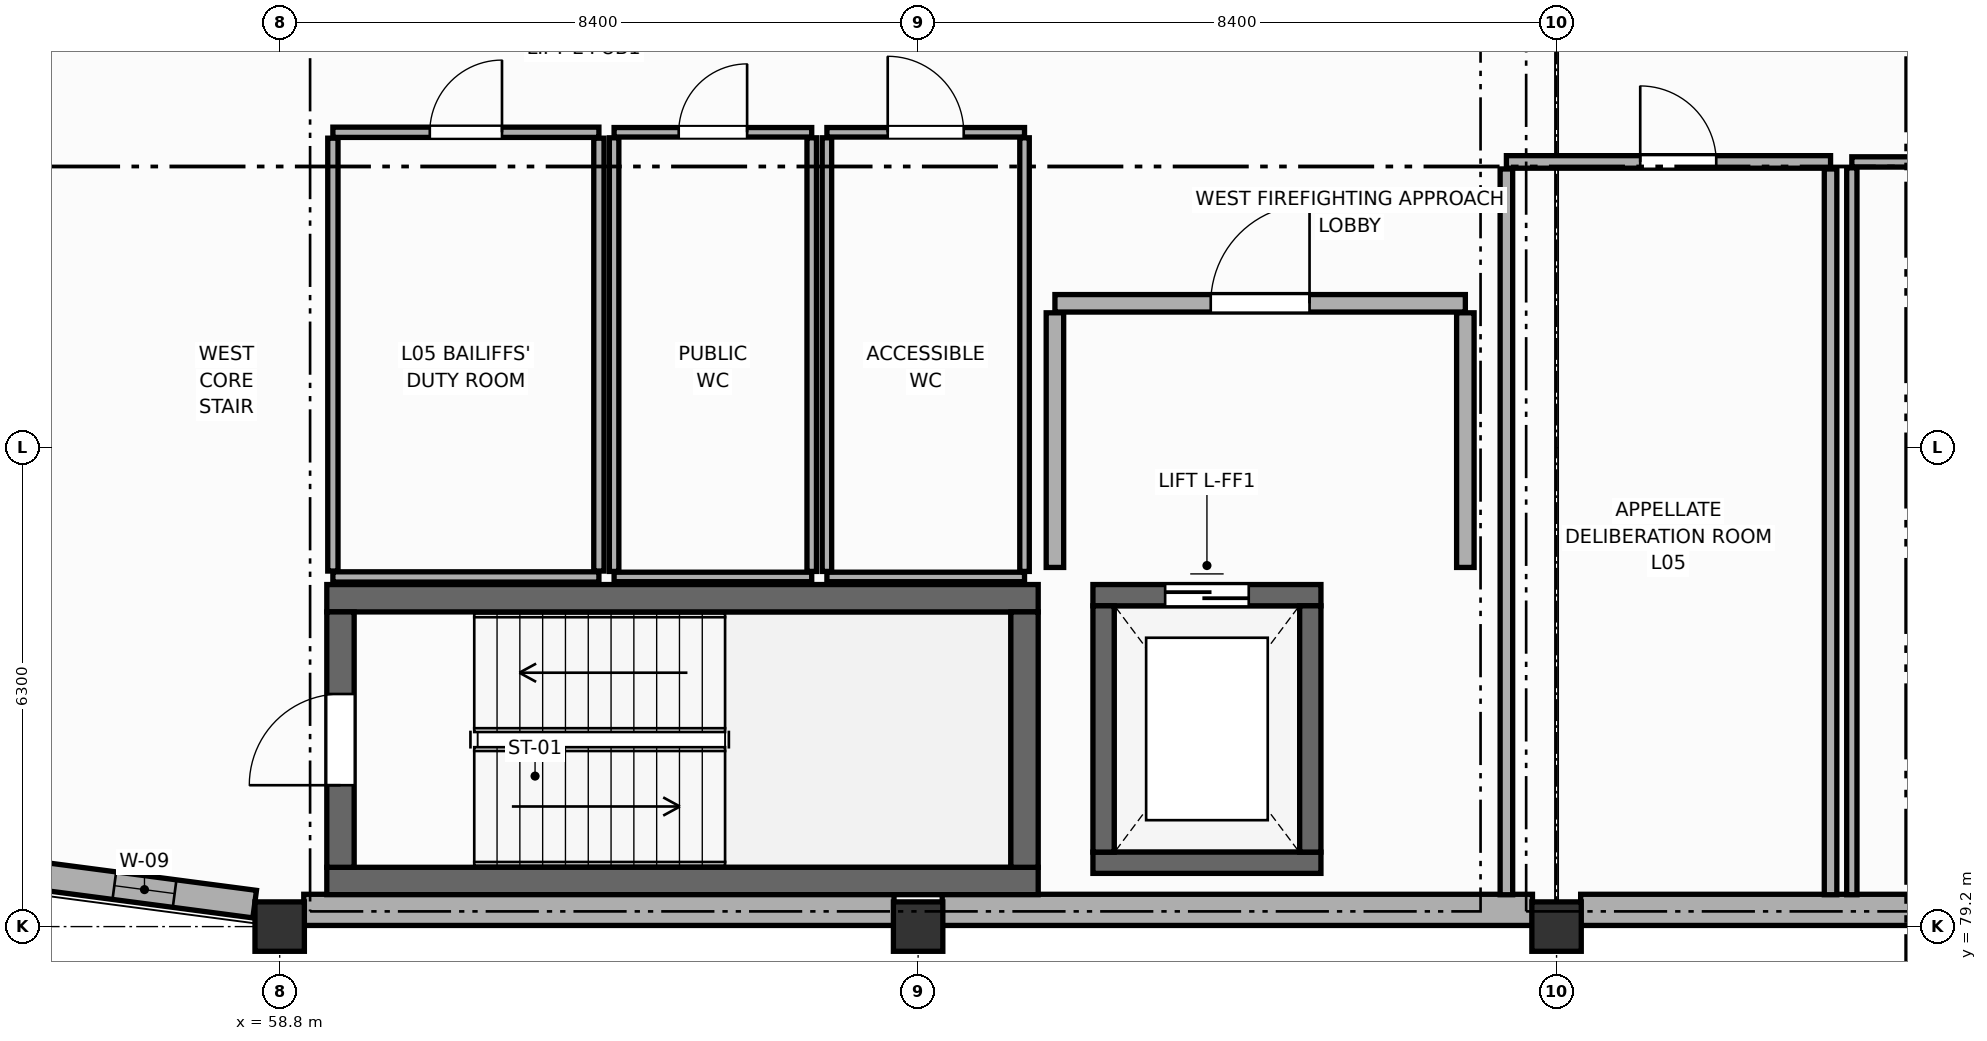
"""IFC4 building model, lengths in metres.
Left out: names, types, materials, properties, quantities, classifications, styles, units other than length and angle.
Written with IfcOpenShell. Run it as: python <this file> out.ifc"""

import sys

from ifc_helpers import new_model, si_unit, direction, frame, frame_2d, origin, origin_2d, place, context, subcontext, project, spatial, rectangle, extrude, element, fill, save


model = new_model("IFC4")
c1 = context("Model", 3, precision=1e-05, world=origin(), true_north=direction((0.0, 1.0)))
c2 = subcontext(c1, "Body", "Model", "MODEL_VIEW")
j1 = project(units=[si_unit("LENGTHUNIT", "METRE"), si_unit("PLANEANGLEUNIT", "RADIAN")], contexts=[c1])
p1 = place(None, origin())
s1 = spatial("IfcSite", under=j1, at=p1, CompositionType="ELEMENT")
p2 = place(p1, origin())
s2 = spatial("IfcBuilding", under=s1, at=p2, CompositionType="ELEMENT")
p3 = place(p2, frame((0.0, 0.0, 18.6)))
s3 = spatial("IfcBuildingStorey", under=s2, at=p3, CompositionType="ELEMENT", Elevation=18.6)
for number, where, z_axis, x_axis in (
    (1, (58.8, 79.2, 0.0), (0.0, 0.0, 1.0), (1.0, 0.0, 0.0)),
    (2, (67.2, 79.2, 0.0), (0.0, 0.0, 1.0), (1.0, 0.0, 0.0)),
    (3, (75.6, 79.2, 0.0), (0.0, 0.0, 1.0), (1.0, 0.0, 0.0)),
):
    element("IfcColumn", number, at=place(p3, frame(where, z_axis=z_axis, x_axis=x_axis)), inside=s3, PredefinedType="COLUMN", context=c2, shape_type="SweptSolid", body=[
        extrude(rectangle(XDim=0.65, YDim=0.65, at=origin_2d()), origin(), (0.0, 0.0, 1.0), 4.2),
    ])
p4 = place(p3, frame((66.883, 79.42, 0.0), z_axis=(0.0, 0.0, 1.0), x_axis=(-1.0, 0.0, 0.0)))
e4 = element("IfcWall", 4, at=p4, inside=s3, PredefinedType="STANDARD", context=c2, shape_type="SweptSolid", body=[
    extrude(rectangle(XDim=7.766, YDim=0.41, at=frame_2d((3.883, 0.0))), origin(), (0.0, 0.0, 1.0), 3.09),
])
p5 = place(p3, frame((75.283, 79.42, 0.0), z_axis=(0.0, 0.0, 1.0), x_axis=(-1.0, 0.0, 0.0)))
e5 = element("IfcWall", 5, at=p5, inside=s3, PredefinedType="STANDARD", context=c2, shape_type="SweptSolid", body=[
    extrude(rectangle(XDim=7.766, YDim=0.41, at=frame_2d((3.883, 0.0))), origin(), (0.0, 0.0, 1.0), 2.44),
])
p6 = place(p3, frame((83.683, 79.42, 0.0), z_axis=(0.0, 0.0, 1.0), x_axis=(-1.0, 0.0, 0.0)))
e6 = element("IfcWall", 6, at=p6, inside=s3, PredefinedType="STANDARD", context=c2, shape_type="SweptSolid", body=[
    extrude(rectangle(XDim=7.766, YDim=0.41, at=frame_2d((3.883, 0.0))), origin(), (0.0, 0.0, 1.0), 2.44),
])
p7 = place(p3, frame((55.572, 79.877, 0.0), z_axis=(0.0, 0.0, 1.0), x_axis=(0.99144889538, -0.13049554724, 0.0)))
e7 = element("IfcWall", 7, at=p7, inside=s3, PredefinedType="ELEMENTEDWALL", context=c2, shape_type="SweptSolid", body=[
    extrude(rectangle(XDim=2.924, YDim=0.365, at=frame_2d((1.462, 0.0))), origin(), (0.0, 0.0, 1.0), 3.09),
])
p8 = place(p7, frame((1.062, 0.0, 0.85)))
e8 = element("IfcOpeningElement", 8, at=p8, cuts=e7, PredefinedType="OPENING", context=c2, shape_type="SweptSolid", body=[
    extrude(rectangle(XDim=0.8, YDim=1.7, at=frame_2d((0.4, 0.85))), frame((0.0, 0.192, 0.0), z_axis=(0.0, -1.0, 0.0), x_axis=(1.0, 0.0, 0.0)), (0.0, 0.0, 1.0), 0.385),
])
for number, where, z_axis, x_axis in (
    (9, (59.42, 83.52, 0.0), (0.0, 0.0, 1.0), (1.0, 0.0, 0.0)),
    (10, (68.78, 79.8, 0.0), (0.0, 0.0, 1.0), (-1.0, 0.0, 0.0)),
):
    element("IfcWall", number, at=place(p3, frame(where, z_axis=z_axis, x_axis=x_axis)), inside=s3, PredefinedType="SHEAR", context=c2, shape_type="SweptSolid", body=[
        extrude(rectangle(XDim=9.36, YDim=0.36, at=frame_2d((4.68, 0.0))), origin(), (0.0, 0.0, 1.0), 3.96),
    ])
p9 = place(p3, frame((59.6, 79.98, 0.0), z_axis=(0.0, 0.0, 1.0), x_axis=(0.0, 1.0, 0.0)))
e11 = element("IfcWall", 11, at=p9, inside=s3, PredefinedType="SHEAR", context=c2, shape_type="SweptSolid", body=[
    extrude(rectangle(XDim=3.36, YDim=0.36, at=frame_2d((1.68, 0.0))), origin(), (0.0, 0.0, 1.0), 3.96),
])
p10 = place(p9, frame((1.08, 0.0, 0.0)))
e12 = element("IfcOpeningElement", 12, at=p10, cuts=e11, PredefinedType="OPENING", context=c2, shape_type="SweptSolid", body=[
    extrude(rectangle(XDim=1.2, YDim=2.2, at=frame_2d((0.6, 1.1))), frame((0.0, 0.19, 0.0), z_axis=(0.0, -1.0, 0.0), x_axis=(1.0, 0.0, 0.0)), (0.0, 0.0, 1.0), 0.38),
])
p11 = place(p3, frame((68.6, 83.34, 0.0), z_axis=(0.0, 0.0, 1.0), x_axis=(0.0, -1.0, 0.0)))
e13 = element("IfcWall", 13, at=p11, inside=s3, PredefinedType="SHEAR", context=c2, shape_type="SweptSolid", body=[
    extrude(rectangle(XDim=3.36, YDim=0.36, at=frame_2d((1.68, 0.0))), origin(), (0.0, 0.0, 1.0), 3.96),
])
p12 = place(p3, frame((69.5, 83.56, 0.0), z_axis=(0.0, 0.0, 1.0), x_axis=(1.0, 0.0, 0.0)))
e14 = element("IfcWall", 14, at=p12, inside=s3, PredefinedType="SHEAR", context=c2, shape_type="SweptSolid", body=[
    extrude(rectangle(XDim=3.0, YDim=0.28, at=frame_2d((1.5, 0.0))), origin(), (0.0, 0.0, 1.0), 3.96),
])
p13 = place(p12, frame((0.95, 0.0, 0.0)))
e15 = element("IfcOpeningElement", 15, at=p13, cuts=e14, PredefinedType="OPENING", context=c2, shape_type="SweptSolid", body=[
    extrude(rectangle(XDim=1.1, YDim=2.2, at=frame_2d((0.55, 1.1))), frame((0.0, 0.15, 0.0), z_axis=(0.0, -1.0, 0.0), x_axis=(1.0, 0.0, 0.0)), (0.0, 0.0, 1.0), 0.3),
])
p14 = place(p3, frame((72.5, 80.04, 0.0), z_axis=(0.0, 0.0, 1.0), x_axis=(-1.0, 0.0, 0.0)))
e16 = element("IfcWall", 16, at=p14, inside=s3, PredefinedType="SHEAR", context=c2, shape_type="SweptSolid", body=[
    extrude(rectangle(XDim=3.0, YDim=0.28, at=frame_2d((1.5, 0.0))), origin(), (0.0, 0.0, 1.0), 3.96),
])
for number, where, z_axis, x_axis in (
    (17, (69.64, 80.18, 0.0), (0.0, 0.0, 1.0), (0.0, 1.0, 0.0)),
    (18, (72.36, 83.42, 0.0), (0.0, 0.0, 1.0), (0.0, -1.0, 0.0)),
):
    element("IfcWall", number, at=place(p3, frame(where, z_axis=z_axis, x_axis=x_axis)), inside=s3, PredefinedType="SHEAR", context=c2, shape_type="SweptSolid", body=[
        extrude(rectangle(XDim=3.24, YDim=0.28, at=frame_2d((1.62, 0.0))), origin(), (0.0, 0.0, 1.0), 3.96),
    ])
p15 = place(p3, frame((69.0, 87.4, 0.0), z_axis=(0.0, 0.0, 1.0), x_axis=(1.0, 0.0, 0.0)))
e19 = element("IfcWall", 19, at=p15, inside=s3, PredefinedType="STANDARD", context=c2, shape_type="SweptSolid", body=[
    extrude(rectangle(XDim=5.4, YDim=0.23, at=frame_2d((2.7, 0.0))), origin(), (0.0, 0.0, 1.0), 3.34),
])
p16 = place(p15, frame((2.05, 0.0, 0.0)))
e20 = element("IfcOpeningElement", 20, at=p16, cuts=e19, PredefinedType="OPENING", context=c2, shape_type="SweptSolid", body=[
    extrude(rectangle(XDim=1.3, YDim=2.2, at=frame_2d((0.65, 1.1))), frame((0.0, 0.125, 0.0), z_axis=(0.0, -1.0, 0.0), x_axis=(1.0, 0.0, 0.0)), (0.0, 0.0, 1.0), 0.25),
])
for number, where, z_axis, x_axis in (
    (21, (69.0, 83.925, 0.0), (0.0, 0.0, 1.0), (0.0, 1.0, 0.0)),
    (22, (74.4, 87.275, 0.0), (0.0, 0.0, 1.0), (0.0, -1.0, 0.0)),
):
    element("IfcWall", number, at=place(p3, frame(where, z_axis=z_axis, x_axis=x_axis)), inside=s3, PredefinedType="STANDARD", context=c2, shape_type="SweptSolid", body=[
        extrude(rectangle(XDim=3.35, YDim=0.23, at=frame_2d((1.675, 0.0))), origin(), (0.0, 0.0, 1.0), 3.34),
    ])
p17 = place(p3, frame((63.2, 89.65, 0.0), z_axis=(0.0, 0.0, 1.0), x_axis=(1.0, 0.0, 0.0)))
e23 = element("IfcWall", 23, at=p17, inside=s3, PredefinedType="PARTITIONING", context=c2, shape_type="SweptSolid", body=[
    extrude(rectangle(XDim=2.6, YDim=0.125, at=frame_2d((1.3, 0.0))), origin(), (0.0, 0.0, 1.0), 3.945),
])
p18 = place(p17, frame((0.85, 0.0, 0.0)))
e24 = element("IfcOpeningElement", 24, at=p18, cuts=e23, PredefinedType="OPENING", context=c2, shape_type="SweptSolid", body=[
    extrude(rectangle(XDim=0.9, YDim=2.1, at=frame_2d((0.45, 1.05))), frame((0.0, 0.073, 0.0), z_axis=(0.0, -1.0, 0.0), x_axis=(1.0, 0.0, 0.0)), (0.0, 0.0, 1.0), 0.145),
])
p19 = place(p3, frame((65.8, 83.8, 0.0), z_axis=(0.0, 0.0, 1.0), x_axis=(-1.0, 0.0, 0.0)))
e25 = element("IfcWall", 25, at=p19, inside=s3, PredefinedType="PARTITIONING", context=c2, shape_type="SweptSolid", body=[
    extrude(rectangle(XDim=2.6, YDim=0.125, at=frame_2d((1.3, 0.0))), origin(), (0.0, 0.0, 1.0), 3.945),
])
for number, where, z_axis, x_axis in (
    (26, (63.2, 83.873, 0.0), (0.0, 0.0, 1.0), (0.0, 1.0, 0.0)),
    (27, (65.8, 89.577, 0.0), (0.0, 0.0, 1.0), (0.0, -1.0, 0.0)),
):
    element("IfcWall", number, at=place(p3, frame(where, z_axis=z_axis, x_axis=x_axis)), inside=s3, PredefinedType="PARTITIONING", context=c2, shape_type="SweptSolid", body=[
        extrude(rectangle(XDim=5.705, YDim=0.125, at=frame_2d((2.853, 0.0))), origin(), (0.0, 0.0, 1.0), 3.34),
    ])
p20 = place(p3, frame((66.0, 89.65, 0.0), z_axis=(0.0, 0.0, 1.0), x_axis=(1.0, 0.0, 0.0)))
e28 = element("IfcWall", 28, at=p20, inside=s3, PredefinedType="PARTITIONING", context=c2, shape_type="SweptSolid", body=[
    extrude(rectangle(XDim=2.6, YDim=0.125, at=frame_2d((1.3, 0.0))), origin(), (0.0, 0.0, 1.0), 2.44),
])
p21 = place(p20, frame((0.8, 0.0, 0.0)))
e29 = element("IfcOpeningElement", 29, at=p21, cuts=e28, PredefinedType="OPENING", context=c2, shape_type="SweptSolid", body=[
    extrude(rectangle(XDim=1.0, YDim=2.1, at=frame_2d((0.5, 1.05))), frame((0.0, 0.073, 0.0), z_axis=(0.0, -1.0, 0.0), x_axis=(1.0, 0.0, 0.0)), (0.0, 0.0, 1.0), 0.145),
])
p22 = place(p3, frame((68.6, 83.8, 0.0), z_axis=(0.0, 0.0, 1.0), x_axis=(-1.0, 0.0, 0.0)))
e30 = element("IfcWall", 30, at=p22, inside=s3, PredefinedType="PARTITIONING", context=c2, shape_type="SweptSolid", body=[
    extrude(rectangle(XDim=2.6, YDim=0.125, at=frame_2d((1.3, 0.0))), origin(), (0.0, 0.0, 1.0), 2.44),
])
for number, where, z_axis, x_axis in (
    (31, (66.0, 83.873, 0.0), (0.0, 0.0, 1.0), (0.0, 1.0, 0.0)),
    (32, (68.6, 89.577, 0.0), (0.0, 0.0, 1.0), (0.0, -1.0, 0.0)),
):
    element("IfcWall", number, at=place(p3, frame(where, z_axis=z_axis, x_axis=x_axis)), inside=s3, PredefinedType="PARTITIONING", context=c2, shape_type="SweptSolid", body=[
        extrude(rectangle(XDim=5.705, YDim=0.125, at=frame_2d((2.853, 0.0))), origin(), (0.0, 0.0, 1.0), 3.34),
    ])
p23 = place(p3, frame((59.5, 89.65, 0.0), z_axis=(0.0, 0.0, 1.0), x_axis=(1.0, 0.0, 0.0)))
e33 = element("IfcWall", 33, at=p23, inside=s3, PredefinedType="PARTITIONING", context=c2, shape_type="SweptSolid", body=[
    extrude(rectangle(XDim=3.5, YDim=0.135, at=frame_2d((1.75, 0.0))), origin(), (0.0, 0.0, 1.0), 3.945),
])
p24 = place(p23, frame((1.275, 0.0, 0.0)))
e34 = element("IfcOpeningElement", 34, at=p24, cuts=e33, PredefinedType="OPENING", context=c2, shape_type="SweptSolid", body=[
    extrude(rectangle(XDim=0.95, YDim=2.15, at=frame_2d((0.475, 1.075))), frame((0.0, 0.077, 0.0), z_axis=(0.0, -1.0, 0.0), x_axis=(1.0, 0.0, 0.0)), (0.0, 0.0, 1.0), 0.155),
])
p25 = place(p3, frame((63.0, 83.8, 0.0), z_axis=(0.0, 0.0, 1.0), x_axis=(-1.0, 0.0, 0.0)))
e35 = element("IfcWall", 35, at=p25, inside=s3, PredefinedType="PARTITIONING", context=c2, shape_type="SweptSolid", body=[
    extrude(rectangle(XDim=3.5, YDim=0.135, at=frame_2d((1.75, 0.0))), origin(), (0.0, 0.0, 1.0), 3.945),
])
for number, where, z_axis, x_axis in (
    (36, (59.5, 83.877, 0.0), (0.0, 0.0, 1.0), (0.0, 1.0, 0.0)),
    (37, (63.0, 89.573, 0.0), (0.0, 0.0, 1.0), (0.0, -1.0, 0.0)),
):
    element("IfcWall", number, at=place(p3, frame(where, z_axis=z_axis, x_axis=x_axis)), inside=s3, PredefinedType="PARTITIONING", context=c2, shape_type="SweptSolid", body=[
        extrude(rectangle(XDim=5.695, YDim=0.135, at=frame_2d((2.848, 0.0))), origin(), (0.0, 0.0, 1.0), 3.34),
    ])
p26 = place(p3, frame((74.94, 89.26, 0.0), z_axis=(0.0, 0.0, 1.0), x_axis=(1.0, 0.0, 0.0)))
e38 = element("IfcWall", 38, at=p26, inside=s3, PredefinedType="PARTITIONING", context=c2, shape_type="SweptSolid", body=[
    extrude(rectangle(XDim=4.265, YDim=0.165, at=frame_2d((2.133, 0.0))), origin(), (0.0, 0.0, 1.0), 2.44),
])
p27 = place(p26, frame((1.761, 0.0, 0.0)))
e39 = element("IfcOpeningElement", 39, at=p27, cuts=e38, PredefinedType="OPENING", context=c2, shape_type="SweptSolid", body=[
    extrude(rectangle(XDim=1.0, YDim=2.15, at=frame_2d((0.5, 1.075))), frame((0.0, 0.093, 0.0), z_axis=(0.0, -1.0, 0.0), x_axis=(1.0, 0.0, 0.0)), (0.0, 0.0, 1.0), 0.185),
])
p28 = place(p3, frame((74.94, 79.619, 0.0), z_axis=(0.0, 0.0, 1.0), x_axis=(0.0, 1.0, 0.0)))
e40 = element("IfcWall", 40, at=p28, inside=s3, PredefinedType="PARTITIONING", context=c2, shape_type="SweptSolid", body=[
    extrude(rectangle(XDim=9.549, YDim=0.165, at=frame_2d((4.774, 0.0))), origin(), (0.0, 0.0, 1.0), 2.44),
])
p29 = place(p3, frame((79.205, 89.167, 0.0), z_axis=(0.0, 0.0, 1.0), x_axis=(0.0, -1.0, 0.0)))
e41 = element("IfcWall", 41, at=p29, inside=s3, PredefinedType="PARTITIONING", context=c2, shape_type="SweptSolid", body=[
    extrude(rectangle(XDim=9.549, YDim=0.165, at=frame_2d((4.774, 0.0))), origin(), (0.0, 0.0, 1.0), 3.34),
])
p30 = place(p3, frame((79.485, 89.26, 0.0), z_axis=(0.0, 0.0, 1.0), x_axis=(1.0, 0.0, 0.0)))
e42 = element("IfcWall", 42, at=p30, inside=s3, PredefinedType="PARTITIONING", context=c2, shape_type="SweptSolid", body=[
    extrude(rectangle(XDim=5.175, YDim=0.135, at=frame_2d((2.587, 0.0))), origin(), (0.0, 0.0, 1.0), 2.44),
])
p31 = place(p30, frame((1.584, 0.0, 0.0)))
e43 = element("IfcOpeningElement", 43, at=p31, cuts=e42, PredefinedType="OPENING", context=c2, shape_type="SweptSolid", body=[
    extrude(rectangle(XDim=0.95, YDim=2.15, at=frame_2d((0.475, 1.075))), frame((0.0, 0.077, 0.0), z_axis=(0.0, -1.0, 0.0), x_axis=(1.0, 0.0, 0.0)), (0.0, 0.0, 1.0), 0.155),
])
p32 = place(p3, frame((79.485, 79.619, 0.0), z_axis=(0.0, 0.0, 1.0), x_axis=(0.0, 1.0, 0.0)))
e44 = element("IfcWall", 44, at=p32, inside=s3, PredefinedType="PARTITIONING", context=c2, shape_type="SweptSolid", body=[
    extrude(rectangle(XDim=9.564, YDim=0.135, at=frame_2d((4.782, 0.0))), origin(), (0.0, 0.0, 1.0), 3.34),
])
p33 = place(p8, origin())
e45 = element("IfcWindow", 45, at=p33, inside=s3, PartitioningType="SINGLE_PANEL", PredefinedType="WINDOW", context=c2, shape_type="SweptSolid", body=[
    extrude(rectangle(XDim=0.8, YDim=1.7, at=frame_2d((0.4, 0.85))), frame((0.0, 0.03, 0.0), z_axis=(0.0, -1.0, 0.0), x_axis=(1.0, 0.0, 0.0)), (0.0, 0.0, 1.0), 0.06),
])
fill(e8, e45)
p34 = place(p10, origin())
e46 = element("IfcDoor", 46, at=p34, inside=s3, OperationType="SINGLE_SWING_LEFT", PredefinedType="DOOR", context=c2, shape_type="SweptSolid", body=[
    extrude(rectangle(XDim=1.2, YDim=2.2, at=frame_2d((0.6, 1.1))), frame((0.0, 0.025, 0.0), z_axis=(0.0, -1.0, 0.0), x_axis=(1.0, 0.0, 0.0)), (0.0, 0.0, 1.0), 0.05),
])
fill(e12, e46)
p35 = place(p13, origin())
e47 = element("IfcDoor", 47, at=p35, inside=s3, OperationType="DOUBLE_DOOR_SLIDING", PredefinedType="DOOR", context=c2, shape_type="SweptSolid", body=[
    extrude(rectangle(XDim=1.1, YDim=2.2, at=frame_2d((0.55, 1.1))), frame((0.0, 0.025, 0.0), z_axis=(0.0, -1.0, 0.0), x_axis=(1.0, 0.0, 0.0)), (0.0, 0.0, 1.0), 0.05),
])
fill(e15, e47)
p36 = place(p16, origin())
e48 = element("IfcDoor", 48, at=p36, inside=s3, OperationType="SINGLE_SWING_RIGHT", PredefinedType="DOOR", context=c2, shape_type="SweptSolid", body=[
    extrude(rectangle(XDim=1.3, YDim=2.2, at=frame_2d((0.65, 1.1))), frame((0.0, 0.025, 0.0), z_axis=(0.0, -1.0, 0.0), x_axis=(1.0, 0.0, 0.0)), (0.0, 0.0, 1.0), 0.05),
])
fill(e20, e48)
p37 = place(p18, origin())
e49 = element("IfcDoor", 49, at=p37, inside=s3, OperationType="SINGLE_SWING_RIGHT", PredefinedType="DOOR", context=c2, shape_type="SweptSolid", body=[
    extrude(rectangle(XDim=0.9, YDim=2.1, at=frame_2d((0.45, 1.05))), frame((0.0, 0.025, 0.0), z_axis=(0.0, -1.0, 0.0), x_axis=(1.0, 0.0, 0.0)), (0.0, 0.0, 1.0), 0.05),
])
fill(e24, e49)
p38 = place(p21, origin())
e50 = element("IfcDoor", 50, at=p38, inside=s3, OperationType="SINGLE_SWING_LEFT", PredefinedType="DOOR", context=c2, shape_type="SweptSolid", body=[
    extrude(rectangle(XDim=1.0, YDim=2.1, at=frame_2d((0.5, 1.05))), frame((0.0, 0.025, 0.0), z_axis=(0.0, -1.0, 0.0), x_axis=(1.0, 0.0, 0.0)), (0.0, 0.0, 1.0), 0.05),
])
fill(e29, e50)
p39 = place(p24, origin())
e51 = element("IfcDoor", 51, at=p39, inside=s3, OperationType="SINGLE_SWING_RIGHT", PredefinedType="DOOR", context=c2, shape_type="SweptSolid", body=[
    extrude(rectangle(XDim=0.95, YDim=2.15, at=frame_2d((0.475, 1.075))), frame((0.0, 0.025, 0.0), z_axis=(0.0, -1.0, 0.0), x_axis=(1.0, 0.0, 0.0)), (0.0, 0.0, 1.0), 0.05),
])
fill(e34, e51)
p40 = place(p27, origin())
e52 = element("IfcDoor", 52, at=p40, inside=s3, OperationType="SINGLE_SWING_LEFT", PredefinedType="DOOR", context=c2, shape_type="SweptSolid", body=[
    extrude(rectangle(XDim=1.0, YDim=2.15, at=frame_2d((0.5, 1.075))), frame((0.0, 0.025, 0.0), z_axis=(0.0, -1.0, 0.0), x_axis=(1.0, 0.0, 0.0)), (0.0, 0.0, 1.0), 0.05),
])
fill(e39, e52)
save(model, sys.argv[1])
